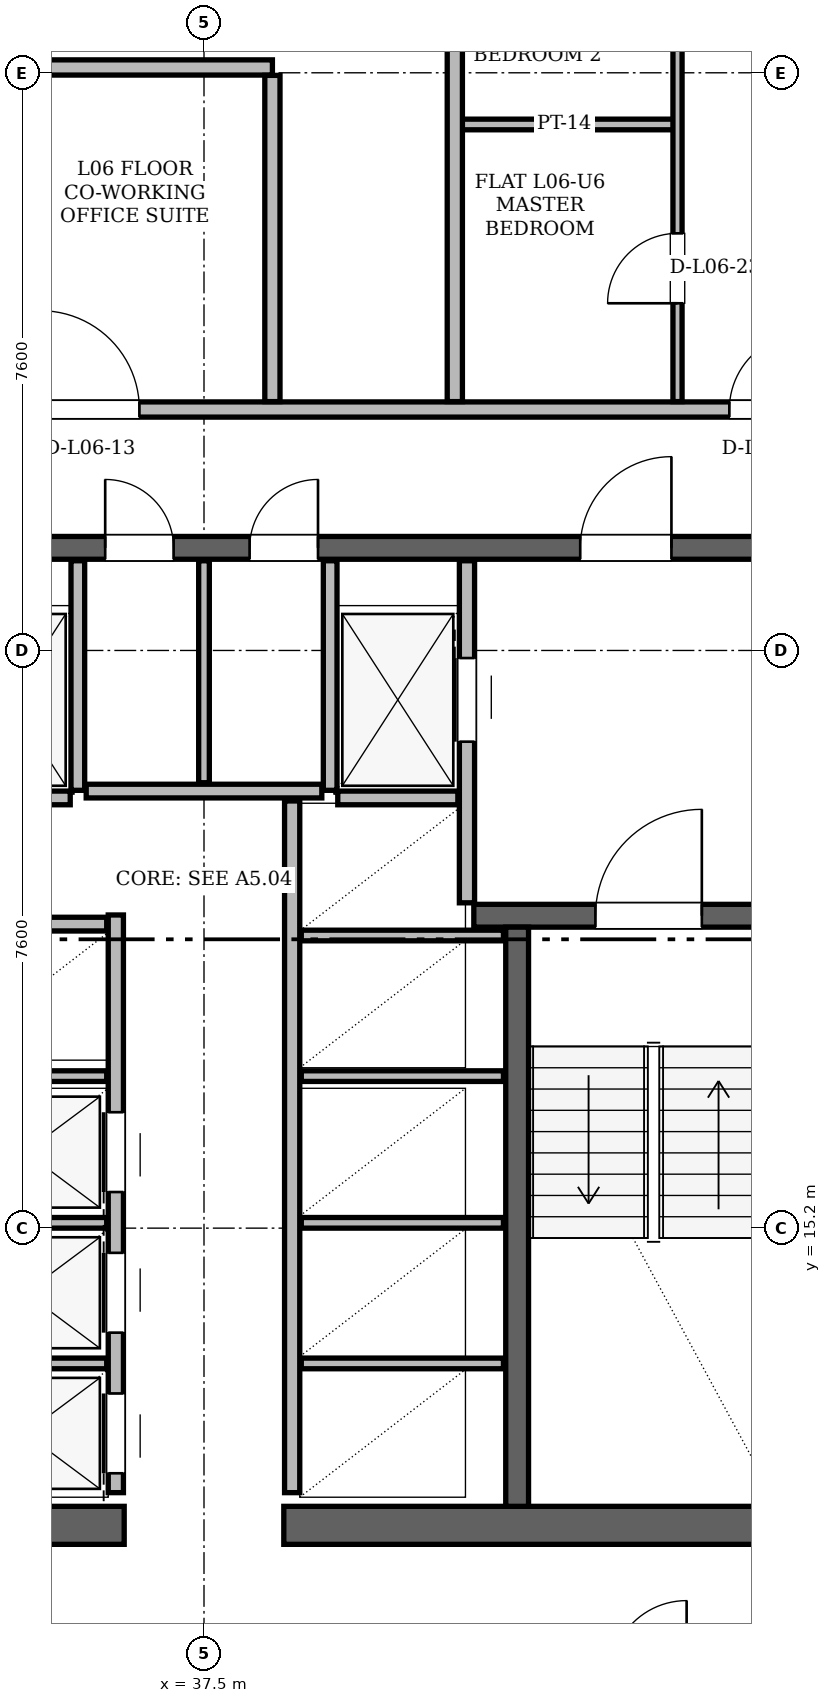
"""IFC4 building model, lengths in metres.
Left out: names, types, materials, properties, quantities, classifications, styles, units other than length and angle.
Written with IfcOpenShell. Run it as: python <this file> out.ifc"""

import sys

from ifc_helpers import new_model, si_unit, direction, frame, frame_2d, origin, place, context, subcontext, project, spatial, rectangle, extrude, element, fill, save


model = new_model("IFC4")
c1 = context("Model", 3, precision=1e-05, world=origin(), true_north=direction((0.0, 1.0)))
c2 = subcontext(c1, "Body", "Model", "MODEL_VIEW")
j1 = project(units=[si_unit("LENGTHUNIT", "METRE"), si_unit("PLANEANGLEUNIT", "RADIAN")], contexts=[c1])
p1 = place(None, origin())
s1 = spatial("IfcSite", under=j1, at=p1, CompositionType="ELEMENT")
p2 = place(p1, origin())
s2 = spatial("IfcBuilding", under=s1, at=p2, CompositionType="ELEMENT")
p3 = place(p2, frame((0.0, 0.0, 27.3)))
s3 = spatial("IfcBuildingStorey", under=s2, at=p3, CompositionType="ELEMENT", Elevation=27.3)
for number, where, z_axis, x_axis in (
    (1, (29.35, 11.29, 0.0), (0.0, 0.0, 1.0), (1.0, 0.0, 0.0)),
    (2, (38.55, 11.29, 0.0), (0.0, 0.0, 1.0), (1.0, 0.0, 0.0)),
):
    element("IfcWall", number, at=place(p3, frame(where, z_axis=z_axis, x_axis=x_axis)), inside=s3, PredefinedType="SHEAR", context=c2, shape_type="SweptSolid", body=[
        extrude(rectangle(XDim=7.1, YDim=0.5, at=frame_2d((3.55, 0.0))), origin(), (0.0, 0.0, 1.0), 3.36),
    ])
p4 = place(p3, frame((29.65, 24.15, 0.0), z_axis=(0.0, 0.0, 1.0), x_axis=(1.0, 0.0, 0.0)))
e3 = element("IfcWall", 3, at=p4, inside=s3, PredefinedType="SHEAR", context=c2, shape_type="SweptSolid", body=[
    extrude(rectangle(XDim=15.7, YDim=0.3, at=frame_2d((7.85, 0.0))), origin(), (0.0, 0.0, 1.0), 3.36),
])
p5 = place(p4, frame((1.7, 0.0, 0.0)))
e4 = element("IfcOpeningElement", 4, at=p5, cuts=e3, PredefinedType="OPENING", context=c2, shape_type="SweptSolid", body=[
    extrude(rectangle(XDim=1.2, YDim=2.2, at=frame_2d((0.6, 1.1))), frame((0.0, 0.15, 0.0), z_axis=(0.0, -1.0, 0.0), x_axis=(1.0, 0.0, 0.0)), (0.0, 0.0, 1.0), 0.3),
])
p6 = place(p4, frame((12.8, 0.0, 0.0)))
e5 = element("IfcOpeningElement", 5, at=p6, cuts=e3, PredefinedType="OPENING", context=c2, shape_type="SweptSolid", body=[
    extrude(rectangle(XDim=1.2, YDim=2.2, at=frame_2d((0.6, 1.1))), frame((0.0, 0.15, 0.0), z_axis=(0.0, -1.0, 0.0), x_axis=(1.0, 0.0, 0.0)), (0.0, 0.0, 1.0), 0.3),
])
p7 = place(p4, frame((6.55, 0.0, 0.0)))
e6 = element("IfcOpeningElement", 6, at=p7, cuts=e3, PredefinedType="OPENING", context=c2, shape_type="SweptSolid", body=[
    extrude(rectangle(XDim=0.9, YDim=2.05, at=frame_2d((0.45, 1.025))), frame((0.0, 0.15, 0.0), z_axis=(0.0, -1.0, 0.0), x_axis=(1.0, 0.0, 0.0)), (0.0, 0.0, 1.0), 0.3),
])
p8 = place(p4, frame((8.45, 0.0, 0.0)))
e7 = element("IfcOpeningElement", 7, at=p8, cuts=e3, PredefinedType="OPENING", context=c2, shape_type="SweptSolid", body=[
    extrude(rectangle(XDim=0.9, YDim=2.05, at=frame_2d((0.45, 1.025))), frame((0.0, 0.15, 0.0), z_axis=(0.0, -1.0, 0.0), x_axis=(1.0, 0.0, 0.0)), (0.0, 0.0, 1.0), 0.3),
])
p9 = place(p3, frame((41.05, 19.31, 0.0), z_axis=(0.0, 0.0, 1.0), x_axis=(1.0, 0.0, 0.0)))
e8 = element("IfcWall", 8, at=p9, inside=s3, PredefinedType="SHEAR", context=c2, shape_type="SweptSolid", body=[
    extrude(rectangle(XDim=4.01, YDim=0.3, at=frame_2d((2.005, 0.0))), origin(), (0.0, 0.0, 1.0), 3.36),
])
p10 = place(p9, frame((1.6, 0.0, 0.0)))
e9 = element("IfcOpeningElement", 9, at=p10, cuts=e8, PredefinedType="OPENING", context=c2, shape_type="SweptSolid", body=[
    extrude(rectangle(XDim=1.4, YDim=2.2, at=frame_2d((0.7, 1.1))), frame((0.0, 0.15, 0.0), z_axis=(0.0, -1.0, 0.0), x_axis=(1.0, 0.0, 0.0)), (0.0, 0.0, 1.0), 0.3),
])
p11 = place(p3, frame((41.62, 11.54, 0.0), z_axis=(0.0, 0.0, 1.0), x_axis=(0.0, 1.0, 0.0)))
e10 = element("IfcWall", 10, at=p11, inside=s3, PredefinedType="SHEAR", context=c2, shape_type="SweptSolid", body=[
    extrude(rectangle(XDim=7.62, YDim=0.3, at=frame_2d((3.81, 0.0))), origin(), (0.0, 0.0, 1.0), 3.36),
])
p12 = place(p3, frame((35.84, 20.96, 0.0), z_axis=(0.0, 0.0, 1.0), x_axis=(0.0, 1.0, 0.0)))
e11 = element("IfcWall", 11, at=p12, inside=s3, PredefinedType="PARTITIONING", context=c2, shape_type="SweptSolid", body=[
    extrude(rectangle(XDim=3.02, YDim=0.18, at=frame_2d((1.51, 0.0))), origin(), (0.0, 0.0, 1.0), 2.4),
])
p13 = place(p3, frame((34.16, 20.86, 0.0), z_axis=(0.0, 0.0, 1.0), x_axis=(1.0, 0.0, 0.0)))
e12 = element("IfcWall", 12, at=p13, inside=s3, PredefinedType="PARTITIONING", context=c2, shape_type="SweptSolid", body=[
    extrude(rectangle(XDim=1.58, YDim=0.18, at=frame_2d((0.79, 0.0))), origin(), (0.0, 0.0, 1.0), 3.36),
])
p14 = place(p3, frame((40.96, 19.48, 0.0), z_axis=(0.0, 0.0, 1.0), x_axis=(0.0, 1.0, 0.0)))
e13 = element("IfcWall", 13, at=p14, inside=s3, PredefinedType="PARTITIONING", context=c2, shape_type="SweptSolid", body=[
    extrude(rectangle(XDim=4.5, YDim=0.2, at=frame_2d((2.25, 0.0))), origin(), (0.0, 0.0, 1.0), 2.4),
])
p15 = place(p14, frame((2.12, 0.0, 0.0)))
e14 = element("IfcOpeningElement", 14, at=p15, cuts=e13, PredefinedType="OPENING", context=c2, shape_type="SweptSolid", body=[
    extrude(rectangle(XDim=1.1, YDim=2.2, at=frame_2d((0.55, 1.1))), frame((0.0, 0.1, 0.0), z_axis=(0.0, -1.0, 0.0), x_axis=(1.0, 0.0, 0.0)), (0.0, 0.0, 1.0), 0.2),
])
p16 = place(p3, frame((39.16, 20.96, 0.0), z_axis=(0.0, 0.0, 1.0), x_axis=(0.0, 1.0, 0.0)))
e15 = element("IfcWall", 15, at=p16, inside=s3, PredefinedType="PARTITIONING", context=c2, shape_type="SweptSolid", body=[
    extrude(rectangle(XDim=3.02, YDim=0.18, at=frame_2d((1.51, 0.0))), origin(), (0.0, 0.0, 1.0), 2.4),
])
p17 = place(p3, frame((39.26, 20.86, 0.0), z_axis=(0.0, 0.0, 1.0), x_axis=(1.0, 0.0, 0.0)))
e16 = element("IfcWall", 16, at=p17, inside=s3, PredefinedType="PARTITIONING", context=c2, shape_type="SweptSolid", body=[
    extrude(rectangle(XDim=1.58, YDim=0.18, at=frame_2d((0.79, 0.0))), origin(), (0.0, 0.0, 1.0), 3.36),
])
p18 = place(p3, frame((36.34, 11.72, 0.0), z_axis=(0.0, 0.0, 1.0), x_axis=(0.0, 1.0, 0.0)))
e17 = element("IfcWall", 17, at=p18, inside=s3, PredefinedType="PARTITIONING", context=c2, shape_type="SweptSolid", body=[
    extrude(rectangle(XDim=7.6, YDim=0.2, at=frame_2d((3.8, 0.0))), origin(), (0.0, 0.0, 1.0), 3.36),
])
p19 = place(p18, frame((0.255, 0.0, 0.0)))
e18 = element("IfcOpeningElement", 18, at=p19, cuts=e17, PredefinedType="OPENING", context=c2, shape_type="SweptSolid", body=[
    extrude(rectangle(XDim=1.05, YDim=2.15, at=frame_2d((0.525, 1.075))), frame((0.0, 0.1, 0.0), z_axis=(0.0, -1.0, 0.0), x_axis=(1.0, 0.0, 0.0)), (0.0, 0.0, 1.0), 0.2),
])
p20 = place(p18, frame((2.105, 0.0, 0.0)))
e19 = element("IfcOpeningElement", 19, at=p20, cuts=e17, PredefinedType="OPENING", context=c2, shape_type="SweptSolid", body=[
    extrude(rectangle(XDim=1.05, YDim=2.15, at=frame_2d((0.525, 1.075))), frame((0.0, 0.1, 0.0), z_axis=(0.0, -1.0, 0.0), x_axis=(1.0, 0.0, 0.0)), (0.0, 0.0, 1.0), 0.2),
])
p21 = place(p18, frame((3.955, 0.0, 0.0)))
e20 = element("IfcOpeningElement", 20, at=p21, cuts=e17, PredefinedType="OPENING", context=c2, shape_type="SweptSolid", body=[
    extrude(rectangle(XDim=1.05, YDim=2.15, at=frame_2d((0.525, 1.075))), frame((0.0, 0.1, 0.0), z_axis=(0.0, -1.0, 0.0), x_axis=(1.0, 0.0, 0.0)), (0.0, 0.0, 1.0), 0.2),
])
p22 = place(p3, frame((33.95, 19.2, 0.0), z_axis=(0.0, 0.0, 1.0), x_axis=(1.0, 0.0, 0.0)))
e21 = element("IfcWall", 21, at=p22, inside=s3, PredefinedType="PARTITIONING", context=c2, shape_type="SweptSolid", body=[
    extrude(rectangle(XDim=2.27, YDim=0.18, at=frame_2d((1.135, 0.0))), origin(), (0.0, 0.0, 1.0), 3.36),
])
for number, where, z_axis, x_axis in (
    (22, (33.56, 13.42, 0.0), (0.0, 0.0, 1.0), (1.0, 0.0, 0.0)),
    (23, (33.56, 15.27, 0.0), (0.0, 0.0, 1.0), (1.0, 0.0, 0.0)),
    (24, (33.56, 17.2, 0.0), (0.0, 0.0, 1.0), (1.0, 0.0, 0.0)),
):
    element("IfcWall", number, at=place(p3, frame(where, z_axis=z_axis, x_axis=x_axis)), inside=s3, PredefinedType="PARTITIONING", context=c2, shape_type="SweptSolid", body=[
        extrude(rectangle(XDim=2.66, YDim=0.14, at=frame_2d((1.33, 0.0))), origin(), (0.0, 0.0, 1.0), 3.36),
    ])
p23 = place(p3, frame((38.66, 11.72, 0.0), z_axis=(0.0, 0.0, 1.0), x_axis=(0.0, 1.0, 0.0)))
e25 = element("IfcWall", 25, at=p23, inside=s3, PredefinedType="PARTITIONING", context=c2, shape_type="SweptSolid", body=[
    extrude(rectangle(XDim=9.1, YDim=0.2, at=frame_2d((4.55, 0.0))), origin(), (0.0, 0.0, 1.0), 3.36),
])
for number, where, z_axis, x_axis in (
    (26, (38.78, 13.42, 0.0), (0.0, 0.0, 1.0), (1.0, 0.0, 0.0)),
    (27, (38.78, 15.27, 0.0), (0.0, 0.0, 1.0), (1.0, 0.0, 0.0)),
    (28, (38.78, 17.2, 0.0), (0.0, 0.0, 1.0), (1.0, 0.0, 0.0)),
    (29, (38.78, 19.05, 0.0), (0.0, 0.0, 1.0), (1.0, 0.0, 0.0)),
):
    element("IfcWall", number, at=place(p3, frame(where, z_axis=z_axis, x_axis=x_axis)), inside=s3, PredefinedType="PARTITIONING", context=c2, shape_type="SweptSolid", body=[
        extrude(rectangle(XDim=2.66, YDim=0.14, at=frame_2d((1.33, 0.0))), origin(), (0.0, 0.0, 1.0), 3.36),
    ])
p24 = place(p3, frame((35.95, 20.95, 0.0), z_axis=(0.0, 0.0, 1.0), x_axis=(1.0, 0.0, 0.0)))
e30 = element("IfcWall", 30, at=p24, inside=s3, PredefinedType="PARTITIONING", context=c2, shape_type="SweptSolid", body=[
    extrude(rectangle(XDim=3.1, YDim=0.18, at=frame_2d((1.55, 0.0))), origin(), (0.0, 0.0, 1.0), 3.36),
])
p25 = place(p3, frame((37.5, 21.06, 0.0), z_axis=(0.0, 0.0, 1.0), x_axis=(0.0, 1.0, 0.0)))
e31 = element("IfcWall", 31, at=p25, inside=s3, PredefinedType="PARTITIONING", context=c2, shape_type="SweptSolid", body=[
    extrude(rectangle(XDim=2.92, YDim=0.14, at=frame_2d((1.46, 0.0))), origin(), (0.0, 0.0, 1.0), 2.4),
])
p26 = place(p3, frame((27.55, 25.97, 0.0), z_axis=(0.0, 0.0, 1.0), x_axis=(1.0, 0.0, 0.0)))
e32 = element("IfcWall", 32, at=p26, inside=s3, PredefinedType="PARTITIONING", context=c2, shape_type="SweptSolid", body=[
    extrude(rectangle(XDim=19.9, YDim=0.2, at=frame_2d((9.95, 0.0))), origin(), (0.0, 0.0, 1.0), 2.738),
])
p27 = place(p26, frame((2.619, 0.0, 0.0)))
e33 = element("IfcOpeningElement", 33, at=p27, cuts=e32, PredefinedType="OPENING", context=c2, shape_type="SweptSolid", body=[
    extrude(rectangle(XDim=1.0, YDim=2.18, at=frame_2d((0.5, 1.09))), frame((0.0, 0.1, 0.0), z_axis=(0.0, -1.0, 0.0), x_axis=(1.0, 0.0, 0.0)), (0.0, 0.0, 1.0), 0.2),
])
p28 = place(p26, frame((7.8, 0.0, 0.0)))
e34 = element("IfcOpeningElement", 34, at=p28, cuts=e32, PredefinedType="OPENING", context=c2, shape_type="SweptSolid", body=[
    extrude(rectangle(XDim=1.3, YDim=2.2, at=frame_2d((0.65, 1.1))), frame((0.0, 0.1, 0.0), z_axis=(0.0, -1.0, 0.0), x_axis=(1.0, 0.0, 0.0)), (0.0, 0.0, 1.0), 0.2),
])
p29 = place(p26, frame((16.862, 0.0, 0.0)))
e35 = element("IfcOpeningElement", 35, at=p29, cuts=e32, PredefinedType="OPENING", context=c2, shape_type="SweptSolid", body=[
    extrude(rectangle(XDim=1.0, YDim=2.18, at=frame_2d((0.5, 1.09))), frame((0.0, 0.1, 0.0), z_axis=(0.0, -1.0, 0.0), x_axis=(1.0, 0.0, 0.0)), (0.0, 0.0, 1.0), 0.2),
])
p30 = place(p3, frame((40.75, 29.72, 0.0), z_axis=(0.0, 0.0, 1.0), x_axis=(1.0, 0.0, 0.0)))
e36 = element("IfcWall", 36, at=p30, inside=s3, PredefinedType="PARTITIONING", context=c2, shape_type="SweptSolid", body=[
    extrude(rectangle(XDim=2.98, YDim=0.14, at=frame_2d((1.49, 0.0))), origin(), (0.0, 0.0, 1.0), 3.36),
])
p31 = place(p3, frame((33.6, 30.47, 0.0), z_axis=(0.0, 0.0, 1.0), x_axis=(1.0, 0.0, 0.0)))
e37 = element("IfcWall", 37, at=p31, inside=s3, PredefinedType="PARTITIONING", context=c2, shape_type="SweptSolid", body=[
    extrude(rectangle(XDim=4.8, YDim=0.2, at=frame_2d((2.4, 0.0))), origin(), (0.0, 0.0, 1.0), 3.36),
])
p32 = place(p3, frame((38.4, 26.074, 0.0), z_axis=(0.0, 0.0, 1.0), x_axis=(0.0, 1.0, 0.0)))
e38 = element("IfcWall", 38, at=p32, inside=s3, PredefinedType="PARTITIONING", context=c2, shape_type="SweptSolid", body=[
    extrude(rectangle(XDim=4.292, YDim=0.2, at=frame_2d((2.146, 0.0))), origin(), (0.0, 0.0, 1.0), 3.36),
])
p33 = place(p3, frame((40.8, 26.074, 0.0), z_axis=(0.0, 0.0, 1.0), x_axis=(0.0, 1.0, 0.0)))
e39 = element("IfcWall", 39, at=p33, inside=s3, PredefinedType="PARTITIONING", context=c2, shape_type="SweptSolid", body=[
    extrude(rectangle(XDim=17.392, YDim=0.2, at=frame_2d((8.696, 0.0))), origin(), (0.0, 0.0, 1.0), 3.36),
])
p34 = place(p3, frame((43.73, 26.074, 0.0), z_axis=(0.0, 0.0, 1.0), x_axis=(0.0, 1.0, 0.0)))
e40 = element("IfcWall", 40, at=p34, inside=s3, PredefinedType="PARTITIONING", context=c2, shape_type="SweptSolid", body=[
    extrude(rectangle(XDim=17.392, YDim=0.12, at=frame_2d((8.696, 0.0))), origin(), (0.0, 0.0, 1.0), 3.36),
])
p35 = place(p34, frame((1.294, 0.0, 0.0)))
e41 = element("IfcOpeningElement", 41, at=p35, cuts=e40, PredefinedType="OPENING", context=c2, shape_type="SweptSolid", body=[
    extrude(rectangle(XDim=0.92, YDim=2.12, at=frame_2d((0.46, 1.06))), frame((0.0, 0.06, 0.0), z_axis=(0.0, -1.0, 0.0), x_axis=(1.0, 0.0, 0.0)), (0.0, 0.0, 1.0), 0.12),
])
p36 = place(p34, frame((4.943, 0.0, 0.0)))
e42 = element("IfcOpeningElement", 42, at=p36, cuts=e40, PredefinedType="OPENING", context=c2, shape_type="SweptSolid", body=[
    extrude(rectangle(XDim=0.92, YDim=2.12, at=frame_2d((0.46, 1.06))), frame((0.0, 0.06, 0.0), z_axis=(0.0, -1.0, 0.0), x_axis=(1.0, 0.0, 0.0)), (0.0, 0.0, 1.0), 0.12),
])
p37 = place(p34, frame((8.074, 0.0, 0.0)))
e43 = element("IfcOpeningElement", 43, at=p37, cuts=e40, PredefinedType="OPENING", context=c2, shape_type="SweptSolid", body=[
    extrude(rectangle(XDim=0.95, YDim=2.1, at=frame_2d((0.475, 1.05))), frame((0.0, 0.06, 0.0), z_axis=(0.0, -1.0, 0.0), x_axis=(1.0, 0.0, 0.0)), (0.0, 0.0, 1.0), 0.12),
])
p38 = place(p34, frame((10.717, 0.0, 0.0)))
e44 = element("IfcOpeningElement", 44, at=p38, cuts=e40, PredefinedType="OPENING", context=c2, shape_type="SweptSolid", body=[
    extrude(rectangle(XDim=0.95, YDim=2.1, at=frame_2d((0.475, 1.05))), frame((0.0, 0.06, 0.0), z_axis=(0.0, -1.0, 0.0), x_axis=(1.0, 0.0, 0.0)), (0.0, 0.0, 1.0), 0.12),
])
p39 = place(p34, frame((13.501, 0.0, 0.0)))
e45 = element("IfcOpeningElement", 45, at=p39, cuts=e40, PredefinedType="OPENING", context=c2, shape_type="SweptSolid", body=[
    extrude(rectangle(XDim=0.95, YDim=2.1, at=frame_2d((0.475, 1.05))), frame((0.0, 0.06, 0.0), z_axis=(0.0, -1.0, 0.0), x_axis=(1.0, 0.0, 0.0)), (0.0, 0.0, 1.0), 0.12),
])
p40 = place(p34, frame((16.033, 0.0, 0.0)))
e46 = element("IfcOpeningElement", 46, at=p40, cuts=e40, PredefinedType="OPENING", context=c2, shape_type="SweptSolid", body=[
    extrude(rectangle(XDim=0.88, YDim=2.08, at=frame_2d((0.44, 1.04))), frame((0.0, 0.06, 0.0), z_axis=(0.0, -1.0, 0.0), x_axis=(1.0, 0.0, 0.0)), (0.0, 0.0, 1.0), 0.12),
])
p41 = place(p15, origin())
e47 = element("IfcDoor", 47, at=p41, inside=s3, OperationType="SLIDING_TO_RIGHT", PredefinedType="DOOR", context=c2, shape_type="SweptSolid", body=[
    extrude(rectangle(XDim=1.1, YDim=2.2, at=frame_2d((0.55, 1.1))), frame((0.0, 0.025, 0.0), z_axis=(0.0, -1.0, 0.0), x_axis=(1.0, 0.0, 0.0)), (0.0, 0.0, 1.0), 0.05),
])
fill(e14, e47)
p42 = place(p19, origin())
e48 = element("IfcDoor", 48, at=p42, inside=s3, OperationType="SLIDING_TO_LEFT", PredefinedType="DOOR", context=c2, shape_type="SweptSolid", body=[
    extrude(rectangle(XDim=1.05, YDim=2.15, at=frame_2d((0.525, 1.075))), frame((0.0, 0.025, 0.0), z_axis=(0.0, -1.0, 0.0), x_axis=(1.0, 0.0, 0.0)), (0.0, 0.0, 1.0), 0.05),
])
fill(e18, e48)
p43 = place(p20, origin())
e49 = element("IfcDoor", 49, at=p43, inside=s3, OperationType="SLIDING_TO_RIGHT", PredefinedType="DOOR", context=c2, shape_type="SweptSolid", body=[
    extrude(rectangle(XDim=1.05, YDim=2.15, at=frame_2d((0.525, 1.075))), frame((0.0, 0.025, 0.0), z_axis=(0.0, -1.0, 0.0), x_axis=(1.0, 0.0, 0.0)), (0.0, 0.0, 1.0), 0.05),
])
fill(e19, e49)
p44 = place(p21, origin())
e50 = element("IfcDoor", 50, at=p44, inside=s3, OperationType="SLIDING_TO_LEFT", PredefinedType="DOOR", context=c2, shape_type="SweptSolid", body=[
    extrude(rectangle(XDim=1.05, YDim=2.15, at=frame_2d((0.525, 1.075))), frame((0.0, 0.025, 0.0), z_axis=(0.0, -1.0, 0.0), x_axis=(1.0, 0.0, 0.0)), (0.0, 0.0, 1.0), 0.05),
])
fill(e20, e50)
p45 = place(p10, origin())
e51 = element("IfcDoor", 51, at=p45, inside=s3, OperationType="SINGLE_SWING_RIGHT", PredefinedType="DOOR", context=c2, shape_type="SweptSolid", body=[
    extrude(rectangle(XDim=1.4, YDim=2.2, at=frame_2d((0.7, 1.1))), frame((0.0, 0.025, 0.0), z_axis=(0.0, -1.0, 0.0), x_axis=(1.0, 0.0, 0.0)), (0.0, 0.0, 1.0), 0.05),
])
fill(e9, e51)
p46 = place(p6, origin())
e52 = element("IfcDoor", 52, at=p46, inside=s3, OperationType="SINGLE_SWING_RIGHT", PredefinedType="DOOR", context=c2, shape_type="SweptSolid", body=[
    extrude(rectangle(XDim=1.2, YDim=2.2, at=frame_2d((0.6, 1.1))), frame((0.0, 0.025, 0.0), z_axis=(0.0, -1.0, 0.0), x_axis=(1.0, 0.0, 0.0)), (0.0, 0.0, 1.0), 0.05),
])
fill(e5, e52)
p47 = place(p7, origin())
e53 = element("IfcDoor", 53, at=p47, inside=s3, OperationType="SINGLE_SWING_LEFT", PredefinedType="DOOR", context=c2, shape_type="SweptSolid", body=[
    extrude(rectangle(XDim=0.9, YDim=2.05, at=frame_2d((0.45, 1.025))), frame((0.0, 0.025, 0.0), z_axis=(0.0, -1.0, 0.0), x_axis=(1.0, 0.0, 0.0)), (0.0, 0.0, 1.0), 0.05),
])
fill(e6, e53)
p48 = place(p8, origin())
e54 = element("IfcDoor", 54, at=p48, inside=s3, OperationType="SINGLE_SWING_RIGHT", PredefinedType="DOOR", context=c2, shape_type="SweptSolid", body=[
    extrude(rectangle(XDim=0.9, YDim=2.05, at=frame_2d((0.45, 1.025))), frame((0.0, 0.025, 0.0), z_axis=(0.0, -1.0, 0.0), x_axis=(1.0, 0.0, 0.0)), (0.0, 0.0, 1.0), 0.05),
])
fill(e7, e54)
p49 = place(p28, origin())
e55 = element("IfcDoor", 55, at=p49, inside=s3, OperationType="SINGLE_SWING_LEFT", PredefinedType="DOOR", context=c2, shape_type="SweptSolid", body=[
    extrude(rectangle(XDim=1.3, YDim=2.2, at=frame_2d((0.65, 1.1))), frame((0.0, 0.025, 0.0), z_axis=(0.0, -1.0, 0.0), x_axis=(1.0, 0.0, 0.0)), (0.0, 0.0, 1.0), 0.05),
])
fill(e34, e55)
p50 = place(p29, origin())
e56 = element("IfcDoor", 56, at=p50, inside=s3, OperationType="SINGLE_SWING_RIGHT", PredefinedType="DOOR", context=c2, shape_type="SweptSolid", body=[
    extrude(rectangle(XDim=1.0, YDim=2.18, at=frame_2d((0.5, 1.09))), frame((0.0, 0.025, 0.0), z_axis=(0.0, -1.0, 0.0), x_axis=(1.0, 0.0, 0.0)), (0.0, 0.0, 1.0), 0.05),
])
fill(e35, e56)
p51 = place(p35, origin())
e57 = element("IfcDoor", 57, at=p51, inside=s3, OperationType="SINGLE_SWING_LEFT", PredefinedType="DOOR", context=c2, shape_type="SweptSolid", body=[
    extrude(rectangle(XDim=0.92, YDim=2.12, at=frame_2d((0.46, 1.06))), frame((0.0, 0.025, 0.0), z_axis=(0.0, -1.0, 0.0), x_axis=(1.0, 0.0, 0.0)), (0.0, 0.0, 1.0), 0.05),
])
fill(e41, e57)
save(model, sys.argv[1])
